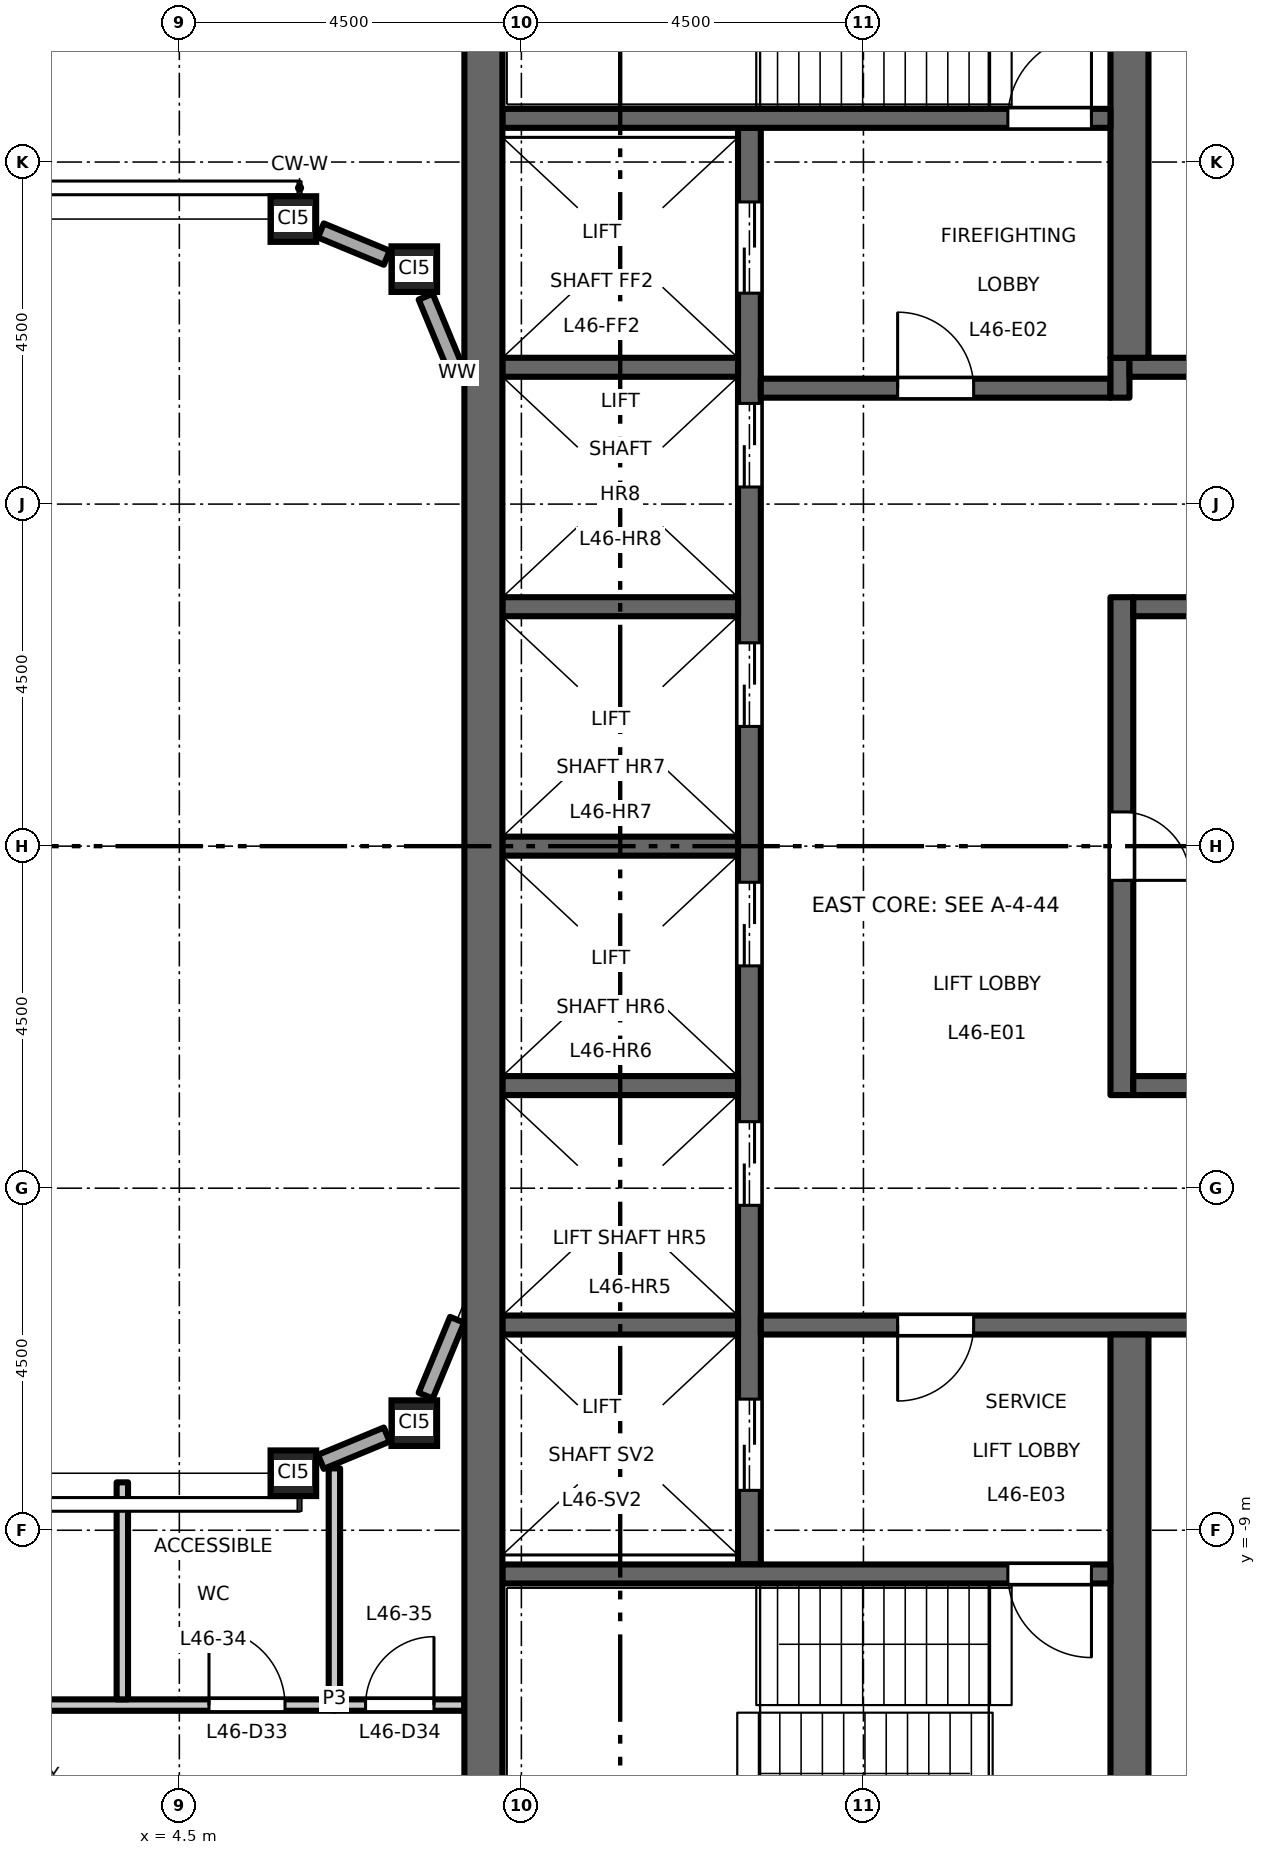
"""IFC4 building model, lengths in metres.
Left out: names, types, materials, properties, quantities, classifications, styles, units other than length and angle.
Written with IfcOpenShell. Run it as: python <this file> out.ifc"""

import sys

from ifc_helpers import new_model, si_unit, direction, frame, frame_2d, origin, origin_2d, place, context, subcontext, project, spatial, rectangle, hollow_rectangle, extrude, element, fill, save


model = new_model("IFC4")
c1 = context("Model", 3, precision=1e-05, world=origin(), true_north=direction((0.0, 1.0)))
c2 = subcontext(c1, "Body", "Model", "MODEL_VIEW")
j1 = project(units=[si_unit("LENGTHUNIT", "METRE"), si_unit("PLANEANGLEUNIT", "RADIAN")], contexts=[c1])
p1 = place(None, origin())
s1 = spatial("IfcSite", under=j1, at=p1, CompositionType="ELEMENT")
p2 = place(p1, origin())
s2 = spatial("IfcBuilding", under=s1, at=p2, CompositionType="ELEMENT")
p3 = place(p2, frame((0.0, 0.0, 215.2)))
s3 = spatial("IfcBuildingStorey", under=s2, at=p3, CompositionType="ELEMENT", Elevation=215.2)
for number, where, z_axis, x_axis in (
    (1, (6.0, -8.25, 0.0), (0.0, 0.0, 1.0), (1.0, 0.0, 0.0)),
    (2, (7.591, -7.591, 0.0), (0.0, 0.0, 1.0), (1.0, 0.0, 0.0)),
    (3, (6.0, 8.25, 0.0), (0.0, 0.0, 1.0), (1.0, 0.0, 0.0)),
    (4, (7.591, 7.591, 0.0), (0.0, 0.0, 1.0), (1.0, 0.0, 0.0)),
):
    element("IfcColumn", number, at=place(p3, frame(where, z_axis=z_axis, x_axis=x_axis)), inside=s3, PredefinedType="COLUMN", context=c2, shape_type="SweptSolid", body=[
        extrude(hollow_rectangle(XDim=0.6, YDim=0.6, WallThickness=0.032, at=origin_2d()), origin(), (0.0, 0.0, 1.0), 4.5),
    ])
p4 = place(p3, frame((12.0, -9.45, 0.0), z_axis=(0.0, 0.0, 1.0), x_axis=(0.0, 1.0, 0.0)))
e5 = element("IfcWall", 5, at=p4, inside=s3, PredefinedType="SHEAR", context=c2, shape_type="SweptSolid", body=[
    extrude(rectangle(XDim=18.9, YDim=0.3, at=frame_2d((9.45, 0.0))), origin(), (0.0, 0.0, 1.0), 4.35),
])
p5 = place(p4, frame((4.725, 0.0, 0.0)))
e6 = element("IfcOpeningElement", 6, at=p5, cuts=e5, PredefinedType="OPENING", context=c2, shape_type="SweptSolid", body=[
    extrude(rectangle(XDim=1.1, YDim=2.1, at=frame_2d((0.55, 1.05))), frame((0.0, 0.16, 0.0), z_axis=(0.0, -1.0, 0.0), x_axis=(1.0, 0.0, 0.0)), (0.0, 0.0, 1.0), 0.32),
])
p6 = place(p4, frame((7.875, 0.0, 0.0)))
e7 = element("IfcOpeningElement", 7, at=p6, cuts=e5, PredefinedType="OPENING", context=c2, shape_type="SweptSolid", body=[
    extrude(rectangle(XDim=1.1, YDim=2.1, at=frame_2d((0.55, 1.05))), frame((0.0, 0.16, 0.0), z_axis=(0.0, -1.0, 0.0), x_axis=(1.0, 0.0, 0.0)), (0.0, 0.0, 1.0), 0.32),
])
p7 = place(p4, frame((11.025, 0.0, 0.0)))
e8 = element("IfcOpeningElement", 8, at=p7, cuts=e5, PredefinedType="OPENING", context=c2, shape_type="SweptSolid", body=[
    extrude(rectangle(XDim=1.1, YDim=2.1, at=frame_2d((0.55, 1.05))), frame((0.0, 0.16, 0.0), z_axis=(0.0, -1.0, 0.0), x_axis=(1.0, 0.0, 0.0)), (0.0, 0.0, 1.0), 0.32),
])
p8 = place(p4, frame((14.175, 0.0, 0.0)))
e9 = element("IfcOpeningElement", 9, at=p8, cuts=e5, PredefinedType="OPENING", context=c2, shape_type="SweptSolid", body=[
    extrude(rectangle(XDim=1.1, YDim=2.1, at=frame_2d((0.55, 1.05))), frame((0.0, 0.16, 0.0), z_axis=(0.0, -1.0, 0.0), x_axis=(1.0, 0.0, 0.0)), (0.0, 0.0, 1.0), 0.32),
])
p9 = place(p4, frame((16.725, 0.0, 0.0)))
e10 = element("IfcOpeningElement", 10, at=p9, cuts=e5, PredefinedType="OPENING", context=c2, shape_type="SweptSolid", body=[
    extrude(rectangle(XDim=1.2, YDim=2.1, at=frame_2d((0.6, 1.05))), frame((0.0, 0.16, 0.0), z_axis=(0.0, -1.0, 0.0), x_axis=(1.0, 0.0, 0.0)), (0.0, 0.0, 1.0), 0.32),
])
p10 = place(p4, frame((0.975, 0.0, 0.0)))
e11 = element("IfcOpeningElement", 11, at=p10, cuts=e5, PredefinedType="OPENING", context=c2, shape_type="SweptSolid", body=[
    extrude(rectangle(XDim=1.2, YDim=2.1, at=frame_2d((0.6, 1.05))), frame((0.0, 0.16, 0.0), z_axis=(0.0, -1.0, 0.0), x_axis=(1.0, 0.0, 0.0)), (0.0, 0.0, 1.0), 0.32),
])
p11 = place(p3, frame((12.15, 6.025, 0.0), z_axis=(0.0, 0.0, 1.0), x_axis=(1.0, 0.0, 0.0)))
e12 = element("IfcWall", 12, at=p11, inside=s3, PredefinedType="SHEAR", context=c2, shape_type="SweptSolid", body=[
    extrude(rectangle(XDim=4.6, YDim=0.25, at=frame_2d((2.3, 0.0))), origin(), (0.0, 0.0, 1.0), 4.35),
])
p12 = place(p11, frame((1.8, 0.0, 0.0)))
e13 = element("IfcOpeningElement", 13, at=p12, cuts=e12, PredefinedType="OPENING", context=c2, shape_type="SweptSolid", body=[
    extrude(rectangle(XDim=1.0, YDim=2.1, at=frame_2d((0.5, 1.05))), frame((0.0, 0.135, 0.0), z_axis=(0.0, -1.0, 0.0), x_axis=(1.0, 0.0, 0.0)), (0.0, 0.0, 1.0), 0.27),
])
p13 = place(p3, frame((16.875, 5.9, 0.0), z_axis=(0.0, 0.0, 1.0), x_axis=(0.0, 1.0, 0.0)))
e14 = element("IfcWall", 14, at=p13, inside=s3, PredefinedType="SHEAR", context=c2, shape_type="SweptSolid", body=[
    extrude(rectangle(XDim=0.525, YDim=0.25, at=frame_2d((0.263, 0.0))), origin(), (0.0, 0.0, 1.0), 4.35),
])
p14 = place(p3, frame((17.0, 6.3, 0.0), z_axis=(0.0, 0.0, 1.0), x_axis=(1.0, 0.0, 0.0)))
e15 = element("IfcWall", 15, at=p14, inside=s3, PredefinedType="SHEAR", context=c2, shape_type="SweptSolid", body=[
    extrude(rectangle(XDim=4.25, YDim=0.25, at=frame_2d((2.125, 0.0))), origin(), (0.0, 0.0, 1.0), 4.35),
])
p15 = place(p3, frame((12.15, -6.3, 0.0), z_axis=(0.0, 0.0, 1.0), x_axis=(1.0, 0.0, 0.0)))
e16 = element("IfcWall", 16, at=p15, inside=s3, PredefinedType="SHEAR", context=c2, shape_type="SweptSolid", body=[
    extrude(rectangle(XDim=9.1, YDim=0.25, at=frame_2d((4.55, 0.0))), origin(), (0.0, 0.0, 1.0), 4.35),
])
p16 = place(p15, frame((1.8, 0.0, 0.0)))
e17 = element("IfcOpeningElement", 17, at=p16, cuts=e16, PredefinedType="OPENING", context=c2, shape_type="SweptSolid", body=[
    extrude(rectangle(XDim=1.0, YDim=2.1, at=frame_2d((0.5, 1.05))), frame((0.0, 0.135, 0.0), z_axis=(0.0, -1.0, 0.0), x_axis=(1.0, 0.0, 0.0)), (0.0, 0.0, 1.0), 0.27),
])
p17 = place(p3, frame((16.9, -3.275, 0.0), z_axis=(0.0, 0.0, 1.0), x_axis=(0.0, 1.0, 0.0)))
e18 = element("IfcWall", 18, at=p17, inside=s3, PredefinedType="SHEAR", context=c2, shape_type="SweptSolid", body=[
    extrude(rectangle(XDim=6.55, YDim=0.3, at=frame_2d((3.275, 0.0))), origin(), (0.0, 0.0, 1.0), 4.35),
])
p18 = place(p17, frame((2.825, 0.0, 0.0)))
e19 = element("IfcOpeningElement", 19, at=p18, cuts=e18, PredefinedType="OPENING", context=c2, shape_type="SweptSolid", body=[
    extrude(rectangle(XDim=0.9, YDim=2.1, at=frame_2d((0.45, 1.05))), frame((0.0, 0.16, 0.0), z_axis=(0.0, -1.0, 0.0), x_axis=(1.0, 0.0, 0.0)), (0.0, 0.0, 1.0), 0.32),
])
for number, where, z_axis, x_axis in (
    (20, (17.05, 3.15, 0.0), (0.0, 0.0, 1.0), (1.0, 0.0, 0.0)),
    (21, (17.05, -3.15, 0.0), (0.0, 0.0, 1.0), (1.0, 0.0, 0.0)),
):
    element("IfcWall", number, at=place(p3, frame(where, z_axis=z_axis, x_axis=x_axis)), inside=s3, PredefinedType="SHEAR", context=c2, shape_type="SweptSolid", body=[
        extrude(rectangle(XDim=4.2, YDim=0.25, at=frame_2d((2.1, 0.0))), origin(), (0.0, 0.0, 1.0), 4.35),
    ])
for number, where, z_axis, x_axis in (
    (22, (17.0, 6.425, 0.0), (0.0, 0.0, 1.0), (0.0, 1.0, 0.0)),
    (23, (17.0, -13.0, 0.0), (0.0, 0.0, 1.0), (0.0, 1.0, 0.0)),
):
    element("IfcWall", number, at=place(p3, frame(where, z_axis=z_axis, x_axis=x_axis)), inside=s3, PredefinedType="SHEAR", context=c2, shape_type="SweptSolid", body=[
        extrude(rectangle(XDim=6.575, YDim=0.5, at=frame_2d((3.288, 0.0))), origin(), (0.0, 0.0, 1.0), 4.35),
    ])
for number, where, z_axis, x_axis in (
    (24, (8.75, 0.0, 0.0), (0.0, 0.0, 1.0), (1.0, 0.0, 0.0)),
    (25, (8.75, 3.15, 0.0), (0.0, 0.0, 1.0), (1.0, 0.0, 0.0)),
    (26, (8.75, 6.3, 0.0), (0.0, 0.0, 1.0), (1.0, 0.0, 0.0)),
    (27, (8.75, -3.15, 0.0), (0.0, 0.0, 1.0), (1.0, 0.0, 0.0)),
    (28, (8.75, -6.3, 0.0), (0.0, 0.0, 1.0), (1.0, 0.0, 0.0)),
):
    element("IfcWall", number, at=place(p3, frame(where, z_axis=z_axis, x_axis=x_axis)), inside=s3, PredefinedType="SHEAR", context=c2, shape_type="SweptSolid", body=[
        extrude(rectangle(XDim=3.1, YDim=0.25, at=frame_2d((1.55, 0.0))), origin(), (0.0, 0.0, 1.0), 4.35),
    ])
p19 = place(p3, frame((8.75, 9.575, 0.0), z_axis=(0.0, 0.0, 1.0), x_axis=(1.0, 0.0, 0.0)))
e29 = element("IfcWall", 29, at=p19, inside=s3, PredefinedType="SHEAR", context=c2, shape_type="SweptSolid", body=[
    extrude(rectangle(XDim=8.0, YDim=0.25, at=frame_2d((4.0, 0.0))), origin(), (0.0, 0.0, 1.0), 4.35),
])
p20 = place(p19, frame((6.65, 0.0, 0.0)))
e30 = element("IfcOpeningElement", 30, at=p20, cuts=e29, PredefinedType="OPENING", context=c2, shape_type="SweptSolid", body=[
    extrude(rectangle(XDim=1.1, YDim=2.1, at=frame_2d((0.55, 1.05))), frame((0.0, 0.135, 0.0), z_axis=(0.0, -1.0, 0.0), x_axis=(1.0, 0.0, 0.0)), (0.0, 0.0, 1.0), 0.27),
])
p21 = place(p3, frame((8.75, -9.575, 0.0), z_axis=(0.0, 0.0, 1.0), x_axis=(1.0, 0.0, 0.0)))
e31 = element("IfcWall", 31, at=p21, inside=s3, PredefinedType="SHEAR", context=c2, shape_type="SweptSolid", body=[
    extrude(rectangle(XDim=8.0, YDim=0.25, at=frame_2d((4.0, 0.0))), origin(), (0.0, 0.0, 1.0), 4.35),
])
p22 = place(p21, frame((6.65, 0.0, 0.0)))
e32 = element("IfcOpeningElement", 32, at=p22, cuts=e31, PredefinedType="OPENING", context=c2, shape_type="SweptSolid", body=[
    extrude(rectangle(XDim=1.1, YDim=2.1, at=frame_2d((0.55, 1.05))), frame((0.0, 0.135, 0.0), z_axis=(0.0, -1.0, 0.0), x_axis=(1.0, 0.0, 0.0)), (0.0, 0.0, 1.0), 0.27),
])
p23 = place(p3, frame((8.5, -13.0, 0.0), z_axis=(0.0, 0.0, 1.0), x_axis=(0.0, 1.0, 0.0)))
e33 = element("IfcWall", 33, at=p23, inside=s3, PredefinedType="SHEAR", context=c2, shape_type="SweptSolid", body=[
    extrude(rectangle(XDim=26.0, YDim=0.5, at=frame_2d((13.0, 0.0))), origin(), (0.0, 0.0, 1.0), 4.35),
])
p24 = place(p3, frame((6.362, -8.1, 0.0), z_axis=(0.0, 0.0, 1.0), x_axis=(0.923829670615, 0.382803787458, 0.0)))
e34 = element("IfcWall", 34, at=p24, inside=s3, PredefinedType="STANDARD", context=c2, shape_type="SweptSolid", body=[
    extrude(rectangle(XDim=0.938, YDim=0.2, at=frame_2d((0.469, 0.0))), origin(), (0.0, 0.0, 1.0), 3.918),
])
for number, where, z_axis, x_axis in (
    (35, (7.741, -7.229, 0.0), (0.0, 0.0, 1.0), (0.383, 0.924, 0.0)),
    (36, (8.154, 6.231, 0.0), (0.0, 0.0, 1.0), (-0.383, 0.924, 0.0)),
):
    element("IfcWall", number, at=place(p3, frame(where, z_axis=z_axis, x_axis=x_axis)), inside=s3, PredefinedType="STANDARD", context=c2, shape_type="SweptSolid", body=[
        extrude(rectangle(XDim=1.08, YDim=0.2, at=frame_2d((0.54, 0.0))), origin(), (0.0, 0.0, 1.0), 3.918),
    ])
p25 = place(p3, frame((7.229, 7.741, 0.0), z_axis=(0.0, 0.0, 1.0), x_axis=(-0.923829670615, 0.382803787458, 0.0)))
e37 = element("IfcWall", 37, at=p25, inside=s3, PredefinedType="STANDARD", context=c2, shape_type="SweptSolid", body=[
    extrude(rectangle(XDim=0.938, YDim=0.2, at=frame_2d((0.469, 0.0))), origin(), (0.0, 0.0, 1.0), 3.918),
])
p26 = place(p3, frame((-8.25, -11.3, 0.0), z_axis=(0.0, 0.0, 1.0), x_axis=(1.0, 0.0, 0.0)))
e38 = element("IfcWall", 38, at=p26, inside=s3, PredefinedType="PARTITIONING", context=c2, shape_type="SweptSolid", body=[
    extrude(rectangle(XDim=14.79, YDim=0.15, at=frame_2d((7.395, 0.0))), origin(), (0.0, 0.0, 1.0), 4.35),
])
p27 = place(p26, frame((4.35, 0.0, 0.0)))
e39 = element("IfcOpeningElement", 39, at=p27, cuts=e38, PredefinedType="OPENING", context=c2, shape_type="SweptSolid", body=[
    extrude(rectangle(XDim=1.0, YDim=2.1, at=frame_2d((0.5, 1.05))), frame((0.0, 0.085, 0.0), z_axis=(0.0, -1.0, 0.0), x_axis=(1.0, 0.0, 0.0)), (0.0, 0.0, 1.0), 0.17),
])
p28 = place(p26, frame((6.6, 0.0, 0.0)))
e40 = element("IfcOpeningElement", 40, at=p28, cuts=e38, PredefinedType="OPENING", context=c2, shape_type="SweptSolid", body=[
    extrude(rectangle(XDim=1.0, YDim=2.1, at=frame_2d((0.5, 1.05))), frame((0.0, 0.085, 0.0), z_axis=(0.0, -1.0, 0.0), x_axis=(1.0, 0.0, 0.0)), (0.0, 0.0, 1.0), 0.17),
])
p29 = place(p26, frame((13.14, 0.0, 0.0)))
e41 = element("IfcOpeningElement", 41, at=p29, cuts=e38, PredefinedType="OPENING", context=c2, shape_type="SweptSolid", body=[
    extrude(rectangle(XDim=1.0, YDim=2.1, at=frame_2d((0.5, 1.05))), frame((0.0, 0.085, 0.0), z_axis=(0.0, -1.0, 0.0), x_axis=(1.0, 0.0, 0.0)), (0.0, 0.0, 1.0), 0.17),
])
p30 = place(p3, frame((6.54, -11.3, 0.0), z_axis=(0.0, 0.0, 1.0), x_axis=(1.0, 0.0, 0.0)))
e42 = element("IfcWall", 42, at=p30, inside=s3, PredefinedType="PARTITIONING", context=c2, shape_type="SweptSolid", body=[
    extrude(rectangle(XDim=1.71, YDim=0.15, at=frame_2d((0.855, 0.0))), origin(), (0.0, 0.0, 1.0), 4.35),
])
p31 = place(p30, frame((0.41, 0.0, 0.0)))
e43 = element("IfcOpeningElement", 43, at=p31, cuts=e42, PredefinedType="OPENING", context=c2, shape_type="SweptSolid", body=[
    extrude(rectangle(XDim=0.9, YDim=2.1, at=frame_2d((0.45, 1.05))), frame((0.0, 0.085, 0.0), z_axis=(0.0, -1.0, 0.0), x_axis=(1.0, 0.0, 0.0)), (0.0, 0.0, 1.0), 0.17),
])
p32 = place(p3, frame((3.75, -11.225, 0.0), z_axis=(0.0, 0.0, 1.0), x_axis=(0.0, 1.0, 0.0)))
e44 = element("IfcWall", 44, at=p32, inside=s3, PredefinedType="PARTITIONING", context=c2, shape_type="SweptSolid", body=[
    extrude(rectangle(XDim=2.855, YDim=0.15, at=frame_2d((1.427, 0.0))), origin(), (0.0, 0.0, 1.0), 4.35),
])
p33 = place(p3, frame((6.54, -11.225, 0.0), z_axis=(0.0, 0.0, 1.0), x_axis=(0.0, 1.0, 0.0)))
e45 = element("IfcWall", 45, at=p33, inside=s3, PredefinedType="PARTITIONING", context=c2, shape_type="SweptSolid", body=[
    extrude(rectangle(XDim=3.039, YDim=0.15, at=frame_2d((1.52, 0.0))), origin(), (0.0, 0.0, 1.0), 4.35),
])
p34 = place(p12, origin())
e46 = element("IfcDoor", 46, at=p34, inside=s3, OperationType="SINGLE_SWING_RIGHT", PredefinedType="DOOR", context=c2, shape_type="SweptSolid", body=[
    extrude(rectangle(XDim=1.0, YDim=2.1, at=frame_2d((0.5, 1.05))), frame((0.0, 0.025, 0.0), z_axis=(0.0, -1.0, 0.0), x_axis=(1.0, 0.0, 0.0)), (0.0, 0.0, 1.0), 0.05),
])
fill(e13, e46)
p35 = place(p16, origin())
e47 = element("IfcDoor", 47, at=p35, inside=s3, OperationType="SINGLE_SWING_LEFT", PredefinedType="DOOR", context=c2, shape_type="SweptSolid", body=[
    extrude(rectangle(XDim=1.0, YDim=2.1, at=frame_2d((0.5, 1.05))), frame((0.0, 0.025, 0.0), z_axis=(0.0, -1.0, 0.0), x_axis=(1.0, 0.0, 0.0)), (0.0, 0.0, 1.0), 0.05),
])
fill(e17, e47)
p36 = place(p20, origin())
e48 = element("IfcDoor", 48, at=p36, inside=s3, OperationType="SINGLE_SWING_LEFT", PredefinedType="DOOR", context=c2, shape_type="SweptSolid", body=[
    extrude(rectangle(XDim=1.1, YDim=2.1, at=frame_2d((0.55, 1.05))), frame((0.0, 0.025, 0.0), z_axis=(0.0, -1.0, 0.0), x_axis=(1.0, 0.0, 0.0)), (0.0, 0.0, 1.0), 0.05),
])
fill(e30, e48)
p37 = place(p22, origin())
e49 = element("IfcDoor", 49, at=p37, inside=s3, OperationType="SINGLE_SWING_RIGHT", PredefinedType="DOOR", context=c2, shape_type="SweptSolid", body=[
    extrude(rectangle(XDim=1.1, YDim=2.1, at=frame_2d((0.55, 1.05))), frame((0.0, 0.025, 0.0), z_axis=(0.0, -1.0, 0.0), x_axis=(1.0, 0.0, 0.0)), (0.0, 0.0, 1.0), 0.05),
])
fill(e32, e49)
p38 = place(p5, origin())
e50 = element("IfcDoor", 50, at=p38, inside=s3, OperationType="DOUBLE_DOOR_SLIDING", PredefinedType="DOOR", context=c2, shape_type="SweptSolid", body=[
    extrude(rectangle(XDim=1.1, YDim=2.1, at=frame_2d((0.55, 1.05))), frame((0.0, 0.025, 0.0), z_axis=(0.0, -1.0, 0.0), x_axis=(1.0, 0.0, 0.0)), (0.0, 0.0, 1.0), 0.05),
])
fill(e6, e50)
p39 = place(p6, origin())
e51 = element("IfcDoor", 51, at=p39, inside=s3, OperationType="DOUBLE_DOOR_SLIDING", PredefinedType="DOOR", context=c2, shape_type="SweptSolid", body=[
    extrude(rectangle(XDim=1.1, YDim=2.1, at=frame_2d((0.55, 1.05))), frame((0.0, 0.025, 0.0), z_axis=(0.0, -1.0, 0.0), x_axis=(1.0, 0.0, 0.0)), (0.0, 0.0, 1.0), 0.05),
])
fill(e7, e51)
p40 = place(p7, origin())
e52 = element("IfcDoor", 52, at=p40, inside=s3, OperationType="DOUBLE_DOOR_SLIDING", PredefinedType="DOOR", context=c2, shape_type="SweptSolid", body=[
    extrude(rectangle(XDim=1.1, YDim=2.1, at=frame_2d((0.55, 1.05))), frame((0.0, 0.025, 0.0), z_axis=(0.0, -1.0, 0.0), x_axis=(1.0, 0.0, 0.0)), (0.0, 0.0, 1.0), 0.05),
])
fill(e8, e52)
p41 = place(p8, origin())
e53 = element("IfcDoor", 53, at=p41, inside=s3, OperationType="DOUBLE_DOOR_SLIDING", PredefinedType="DOOR", context=c2, shape_type="SweptSolid", body=[
    extrude(rectangle(XDim=1.1, YDim=2.1, at=frame_2d((0.55, 1.05))), frame((0.0, 0.025, 0.0), z_axis=(0.0, -1.0, 0.0), x_axis=(1.0, 0.0, 0.0)), (0.0, 0.0, 1.0), 0.05),
])
fill(e9, e53)
p42 = place(p9, origin())
e54 = element("IfcDoor", 54, at=p42, inside=s3, OperationType="DOUBLE_DOOR_SLIDING", PredefinedType="DOOR", context=c2, shape_type="SweptSolid", body=[
    extrude(rectangle(XDim=1.2, YDim=2.1, at=frame_2d((0.6, 1.05))), frame((0.0, 0.025, 0.0), z_axis=(0.0, -1.0, 0.0), x_axis=(1.0, 0.0, 0.0)), (0.0, 0.0, 1.0), 0.05),
])
fill(e10, e54)
p43 = place(p10, origin())
e55 = element("IfcDoor", 55, at=p43, inside=s3, OperationType="DOUBLE_DOOR_SLIDING", PredefinedType="DOOR", context=c2, shape_type="SweptSolid", body=[
    extrude(rectangle(XDim=1.2, YDim=2.1, at=frame_2d((0.6, 1.05))), frame((0.0, 0.025, 0.0), z_axis=(0.0, -1.0, 0.0), x_axis=(1.0, 0.0, 0.0)), (0.0, 0.0, 1.0), 0.05),
])
fill(e11, e55)
p44 = place(p18, origin())
e56 = element("IfcDoor", 56, at=p44, inside=s3, OperationType="SINGLE_SWING_LEFT", PredefinedType="DOOR", context=c2, shape_type="SweptSolid", body=[
    extrude(rectangle(XDim=0.9, YDim=2.1, at=frame_2d((0.45, 1.05))), frame((0.0, 0.025, 0.0), z_axis=(0.0, -1.0, 0.0), x_axis=(1.0, 0.0, 0.0)), (0.0, 0.0, 1.0), 0.05),
])
fill(e19, e56)
p45 = place(p29, origin())
e57 = element("IfcDoor", 57, at=p45, inside=s3, OperationType="SINGLE_SWING_LEFT", PredefinedType="DOOR", context=c2, shape_type="SweptSolid", body=[
    extrude(rectangle(XDim=1.0, YDim=2.1, at=frame_2d((0.5, 1.05))), frame((0.0, 0.025, 0.0), z_axis=(0.0, -1.0, 0.0), x_axis=(1.0, 0.0, 0.0)), (0.0, 0.0, 1.0), 0.05),
])
fill(e41, e57)
p46 = place(p31, origin())
e58 = element("IfcDoor", 58, at=p46, inside=s3, OperationType="SINGLE_SWING_RIGHT", PredefinedType="DOOR", context=c2, shape_type="SweptSolid", body=[
    extrude(rectangle(XDim=0.9, YDim=2.1, at=frame_2d((0.45, 1.05))), frame((0.0, 0.025, 0.0), z_axis=(0.0, -1.0, 0.0), x_axis=(1.0, 0.0, 0.0)), (0.0, 0.0, 1.0), 0.05),
])
fill(e43, e58)
save(model, sys.argv[1])
